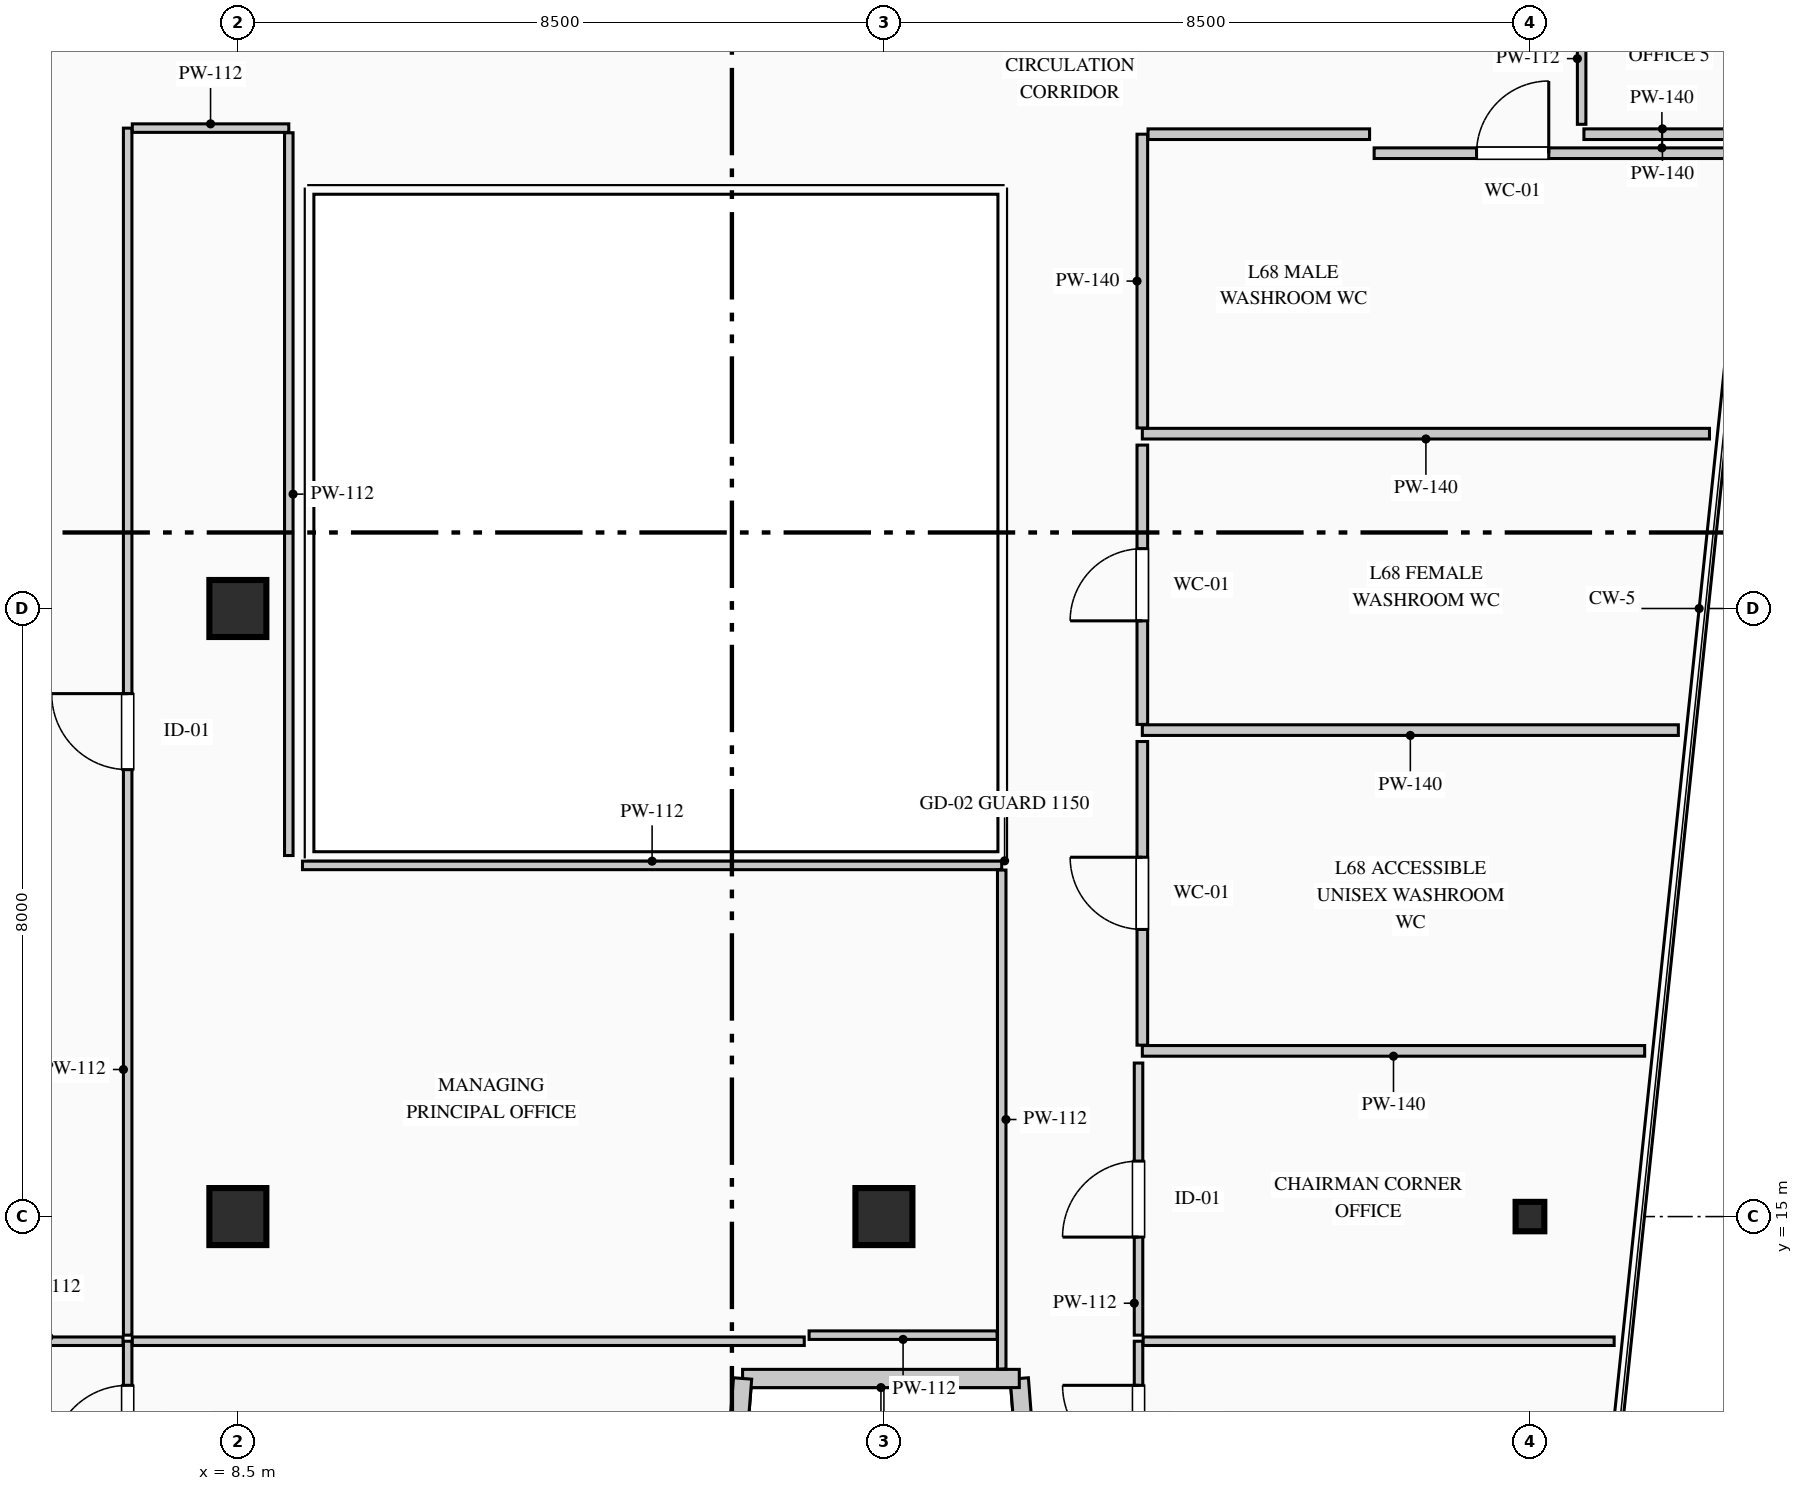
"""IFC4 building model, lengths in metres.
Left out: names, types, materials, properties, quantities, classifications, styles, units other than length and angle.
Written with IfcOpenShell. Run it as: python <this file> out.ifc"""

import sys

from ifc_helpers import new_model, si_unit, direction, frame, frame_2d, origin, origin_2d, place, context, subcontext, project, spatial, rectangle, i_section, extrude, element, fill, save


model = new_model("IFC4")
c1 = context("Model", 3, precision=1e-05, world=origin(), true_north=direction((0.0, 1.0)))
c2 = subcontext(c1, "Body", "Model", "MODEL_VIEW")
j1 = project(units=[si_unit("LENGTHUNIT", "METRE"), si_unit("PLANEANGLEUNIT", "RADIAN")], contexts=[c1])
p1 = place(None, origin())
s1 = spatial("IfcSite", under=j1, at=p1, CompositionType="ELEMENT")
p2 = place(p1, origin())
s2 = spatial("IfcBuilding", under=s1, at=p2, CompositionType="ELEMENT")
p3 = place(p2, frame((0.0, 0.0, 284.35)))
s3 = spatial("IfcBuildingStorey", under=s2, at=p3, CompositionType="ELEMENT", Elevation=284.35)
for number, where, z_axis, x_axis in (
    (1, (8.5, 15.0, 0.0), (0.0, 0.0, 1.0), (1.0, 0.0, 0.0)),
    (2, (8.5, 23.0, 0.0), (0.0, 0.0, 1.0), (1.0, 0.0, 0.0)),
    (3, (17.0, 15.0, 0.0), (0.0, 0.0, 1.0), (1.0, 0.0, 0.0)),
):
    element("IfcColumn", number, at=place(p3, frame(where, z_axis=z_axis, x_axis=x_axis)), inside=s3, PredefinedType="COLUMN", context=c2, shape_type="SweptSolid", body=[
        extrude(rectangle(XDim=0.75, YDim=0.75, at=origin_2d()), origin(), (0.0, 0.0, 1.0), 3.95),
    ])
p4 = place(p3, frame((25.5, 15.0, 0.0), z_axis=(0.0, 0.0, 1.0), x_axis=(1.0, 0.0, 0.0)))
e4 = element("IfcColumn", 4, at=p4, inside=s3, PredefinedType="COLUMN", context=c2, shape_type="SweptSolid", body=[
    extrude(i_section(OverallWidth=0.378, OverallDepth=0.387, WebThickness=0.022, FlangeThickness=0.037, FilletRadius=0.015, at=origin_2d()), origin(), (0.0, 0.0, 1.0), 3.95),
])
p5 = place(p3, frame((19.581, 2.62, 0.0), z_axis=(0.0, 0.0, 1.0), x_axis=(-0.077816860153, 0.996967670627, 0.0)))
e5 = element("IfcWall", 5, at=p5, inside=s3, PredefinedType="STANDARD", context=c2, shape_type="SweptSolid", body=[
    extrude(rectangle(XDim=10.281, YDim=0.24, at=frame_2d((5.141, 0.0))), origin(), (0.0, 0.0, 1.0), 3.7),
])
p6 = place(p5, frame((5.755, 0.0, 0.9)))
e6 = element("IfcOpeningElement", 6, at=p6, cuts=e5, PredefinedType="OPENING", context=c2, shape_type="SweptSolid", body=[
    extrude(rectangle(XDim=1.65, YDim=1.95, at=frame_2d((0.825, 0.975))), frame((0.0, 0.13, 0.0), z_axis=(0.0, -1.0, 0.0), x_axis=(1.0, 0.0, 0.0)), (0.0, 0.0, 1.0), 0.26),
])
p7 = place(p3, frame((18.781, 12.87, 0.0), z_axis=(0.0, 0.0, 1.0), x_axis=(-1.0, 0.0, 0.0)))
e7 = element("IfcWall", 7, at=p7, inside=s3, PredefinedType="STANDARD", context=c2, shape_type="SweptSolid", body=[
    extrude(rectangle(XDim=3.641, YDim=0.24, at=frame_2d((1.82, 0.0))), origin(), (0.0, 0.0, 1.0), 3.7),
])
p8 = place(p3, frame((15.14, 12.87, 0.0), z_axis=(0.0, 0.0, 1.0), x_axis=(-0.077793257511, -0.996969512616, 0.0)))
e8 = element("IfcWall", 8, at=p8, inside=s3, PredefinedType="STANDARD", context=c2, shape_type="SweptSolid", body=[
    extrude(rectangle(XDim=10.281, YDim=0.24, at=frame_2d((5.141, 0.0))), origin(), (0.0, 0.0, 1.0), 3.7),
])
p9 = place(p8, frame((2.876, 0.0, 0.9)))
e9 = element("IfcOpeningElement", 9, at=p9, cuts=e8, PredefinedType="OPENING", context=c2, shape_type="SweptSolid", body=[
    extrude(rectangle(XDim=1.65, YDim=1.95, at=frame_2d((0.825, 0.975))), frame((0.0, 0.13, 0.0), z_axis=(0.0, -1.0, 0.0), x_axis=(1.0, 0.0, 0.0)), (0.0, 0.0, 1.0), 0.26),
])
p10 = place(p3, frame((23.45, 28.99, 0.0), z_axis=(0.0, 0.0, 1.0), x_axis=(1.0, 0.0, 0.0)))
e10 = element("IfcWall", 10, at=p10, inside=s3, PredefinedType="PARTITIONING", context=c2, shape_type="SweptSolid", body=[
    extrude(rectangle(XDim=4.8, YDim=0.14, at=frame_2d((2.4, 0.0))), origin(), (0.0, 0.0, 1.0), 3.7),
])
p11 = place(p10, frame((1.347, 0.0, 0.0)))
e11 = element("IfcOpeningElement", 11, at=p11, cuts=e10, PredefinedType="OPENING", context=c2, shape_type="SweptSolid", body=[
    extrude(rectangle(XDim=0.95, YDim=2.15, at=frame_2d((0.475, 1.075))), frame((0.0, 0.08, 0.0), z_axis=(0.0, -1.0, 0.0), x_axis=(1.0, 0.0, 0.0)), (0.0, 0.0, 1.0), 0.16),
])
p12 = place(p3, frame((26.21, 29.24, 0.0), z_axis=(0.0, 0.0, 1.0), x_axis=(1.0, 0.0, 0.0)))
e12 = element("IfcWall", 12, at=p12, inside=s3, PredefinedType="PARTITIONING", context=c2, shape_type="SweptSolid", body=[
    extrude(rectangle(XDim=2.066, YDim=0.14, at=frame_2d((1.033, 0.0))), origin(), (0.0, 0.0, 1.0), 3.7),
])
p13 = place(p3, frame((27.862, 25.3, 0.0), z_axis=(0.0, 0.0, 1.0), x_axis=(-1.0, 0.0, 0.0)))
e13 = element("IfcWall", 13, at=p13, inside=s3, PredefinedType="PARTITIONING", context=c2, shape_type="SweptSolid", body=[
    extrude(rectangle(XDim=7.462, YDim=0.14, at=frame_2d((3.731, 0.0))), origin(), (0.0, 0.0, 1.0), 3.7),
])
p14 = place(p3, frame((20.4, 25.375, 0.0), z_axis=(0.0, 0.0, 1.0), x_axis=(0.0, 1.0, 0.0)))
e14 = element("IfcWall", 14, at=p14, inside=s3, PredefinedType="PARTITIONING", context=c2, shape_type="SweptSolid", body=[
    extrude(rectangle(XDim=3.865, YDim=0.14, at=frame_2d((1.933, 0.0))), origin(), (0.0, 0.0, 1.0), 3.7),
])
p15 = place(p3, frame((20.475, 29.24, 0.0), z_axis=(0.0, 0.0, 1.0), x_axis=(1.0, 0.0, 0.0)))
e15 = element("IfcWall", 15, at=p15, inside=s3, PredefinedType="PARTITIONING", context=c2, shape_type="SweptSolid", body=[
    extrude(rectangle(XDim=2.915, YDim=0.14, at=frame_2d((1.458, 0.0))), origin(), (0.0, 0.0, 1.0), 3.7),
])
p16 = place(p3, frame((27.452, 21.4, 0.0), z_axis=(0.0, 0.0, 1.0), x_axis=(-1.0, 0.0, 0.0)))
e16 = element("IfcWall", 16, at=p16, inside=s3, PredefinedType="PARTITIONING", context=c2, shape_type="SweptSolid", body=[
    extrude(rectangle(XDim=7.052, YDim=0.14, at=frame_2d((3.526, 0.0))), origin(), (0.0, 0.0, 1.0), 3.7),
])
p17 = place(p3, frame((20.4, 21.475, 0.0), z_axis=(0.0, 0.0, 1.0), x_axis=(0.0, 1.0, 0.0)))
e17 = element("IfcWall", 17, at=p17, inside=s3, PredefinedType="PARTITIONING", context=c2, shape_type="SweptSolid", body=[
    extrude(rectangle(XDim=3.675, YDim=0.14, at=frame_2d((1.837, 0.0))), origin(), (0.0, 0.0, 1.0), 3.7),
])
p18 = place(p17, frame((1.363, 0.0, 0.0)))
e18 = element("IfcOpeningElement", 18, at=p18, cuts=e17, PredefinedType="OPENING", context=c2, shape_type="SweptSolid", body=[
    extrude(rectangle(XDim=0.95, YDim=2.15, at=frame_2d((0.475, 1.075))), frame((0.0, 0.08, 0.0), z_axis=(0.0, -1.0, 0.0), x_axis=(1.0, 0.0, 0.0)), (0.0, 0.0, 1.0), 0.16),
])
p19 = place(p3, frame((27.009, 17.18, 0.0), z_axis=(0.0, 0.0, 1.0), x_axis=(-1.0, 0.0, 0.0)))
e19 = element("IfcWall", 19, at=p19, inside=s3, PredefinedType="PARTITIONING", context=c2, shape_type="SweptSolid", body=[
    extrude(rectangle(XDim=6.609, YDim=0.14, at=frame_2d((3.305, 0.0))), origin(), (0.0, 0.0, 1.0), 3.7),
])
p20 = place(p3, frame((20.4, 17.255, 0.0), z_axis=(0.0, 0.0, 1.0), x_axis=(0.0, 1.0, 0.0)))
e20 = element("IfcWall", 20, at=p20, inside=s3, PredefinedType="PARTITIONING", context=c2, shape_type="SweptSolid", body=[
    extrude(rectangle(XDim=3.995, YDim=0.14, at=frame_2d((1.998, 0.0))), origin(), (0.0, 0.0, 1.0), 3.7),
])
p21 = place(p20, frame((1.522, 0.0, 0.0)))
e21 = element("IfcOpeningElement", 21, at=p21, cuts=e20, PredefinedType="OPENING", context=c2, shape_type="SweptSolid", body=[
    extrude(rectangle(XDim=0.95, YDim=2.15, at=frame_2d((0.475, 1.075))), frame((0.0, 0.08, 0.0), z_axis=(0.0, -1.0, 0.0), x_axis=(1.0, 0.0, 0.0)), (0.0, 0.0, 1.0), 0.16),
])
p22 = place(p3, frame((7.05, 11.2, 0.0), z_axis=(0.0, 0.0, 1.0), x_axis=(0.0, 1.0, 0.0)))
e22 = element("IfcWall", 22, at=p22, inside=s3, PredefinedType="PARTITIONING", context=c2, shape_type="SweptSolid", body=[
    extrude(rectangle(XDim=2.16, YDim=0.112, at=frame_2d((1.08, 0.0))), origin(), (0.0, 0.0, 1.0), 3.7),
])
p23 = place(p22, frame((0.58, 0.0, 0.0)))
e23 = element("IfcOpeningElement", 23, at=p23, cuts=e22, PredefinedType="OPENING", context=c2, shape_type="SweptSolid", body=[
    extrude(rectangle(XDim=1.0, YDim=2.15, at=frame_2d((0.5, 1.075))), frame((0.0, 0.066, 0.0), z_axis=(0.0, -1.0, 0.0), x_axis=(1.0, 0.0, 0.0)), (0.0, 0.0, 1.0), 0.132),
])
p24 = place(p3, frame((5.038, 13.36, 0.0), z_axis=(0.0, 0.0, 1.0), x_axis=(1.0, 0.0, 0.0)))
e24 = element("IfcWall", 24, at=p24, inside=s3, PredefinedType="PARTITIONING", context=c2, shape_type="SweptSolid", body=[
    extrude(rectangle(XDim=1.951, YDim=0.112, at=frame_2d((0.976, 0.0))), origin(), (0.0, 0.0, 1.0), 3.7),
])
p25 = place(p3, frame((7.111, 13.36, 0.0), z_axis=(0.0, 0.0, 1.0), x_axis=(1.0, 0.0, 0.0)))
e25 = element("IfcWall", 25, at=p25, inside=s3, PredefinedType="PARTITIONING", context=c2, shape_type="SweptSolid", body=[
    extrude(rectangle(XDim=8.841, YDim=0.112, at=frame_2d((4.42, 0.0))), origin(), (0.0, 0.0, 1.0), 3.7),
])
p26 = place(p3, frame((20.35, 11.2, 0.0), z_axis=(0.0, 0.0, 1.0), x_axis=(0.0, 1.0, 0.0)))
e26 = element("IfcWall", 26, at=p26, inside=s3, PredefinedType="PARTITIONING", context=c2, shape_type="SweptSolid", body=[
    extrude(rectangle(XDim=2.16, YDim=0.112, at=frame_2d((1.08, 0.0))), origin(), (0.0, 0.0, 1.0), 3.7),
])
p27 = place(p26, frame((0.58, 0.0, 0.0)))
e27 = element("IfcOpeningElement", 27, at=p27, cuts=e26, PredefinedType="OPENING", context=c2, shape_type="SweptSolid", body=[
    extrude(rectangle(XDim=1.0, YDim=2.15, at=frame_2d((0.5, 1.075))), frame((0.0, 0.066, 0.0), z_axis=(0.0, -1.0, 0.0), x_axis=(1.0, 0.0, 0.0)), (0.0, 0.0, 1.0), 0.132),
])
p28 = place(p3, frame((20.411, 13.36, 0.0), z_axis=(0.0, 0.0, 1.0), x_axis=(1.0, 0.0, 0.0)))
e28 = element("IfcWall", 28, at=p28, inside=s3, PredefinedType="PARTITIONING", context=c2, shape_type="SweptSolid", body=[
    extrude(rectangle(XDim=6.197, YDim=0.112, at=frame_2d((3.099, 0.0))), origin(), (0.0, 0.0, 1.0), 3.7),
])
p29 = place(p3, frame((20.35, 13.44, 0.0), z_axis=(0.0, 0.0, 1.0), x_axis=(0.0, 1.0, 0.0)))
e29 = element("IfcWall", 29, at=p29, inside=s3, PredefinedType="PARTITIONING", context=c2, shape_type="SweptSolid", body=[
    extrude(rectangle(XDim=3.58, YDim=0.112, at=frame_2d((1.79, 0.0))), origin(), (0.0, 0.0, 1.0), 3.7),
])
p30 = place(p29, frame((1.29, 0.0, 0.0)))
e30 = element("IfcOpeningElement", 30, at=p30, cuts=e29, PredefinedType="OPENING", context=c2, shape_type="SweptSolid", body=[
    extrude(rectangle(XDim=1.0, YDim=2.15, at=frame_2d((0.5, 1.075))), frame((0.0, 0.066, 0.0), z_axis=(0.0, -1.0, 0.0), x_axis=(1.0, 0.0, 0.0)), (0.0, 0.0, 1.0), 0.132),
])
p31 = place(p3, frame((9.35, 19.62, 0.0), z_axis=(0.0, 0.0, 1.0), x_axis=(1.0, 0.0, 0.0)))
e31 = element("IfcWall", 31, at=p31, inside=s3, PredefinedType="PARTITIONING", context=c2, shape_type="SweptSolid", body=[
    extrude(rectangle(XDim=9.2, YDim=0.112, at=frame_2d((4.6, 0.0))), origin(), (0.0, 0.0, 1.0), 3.7),
])
p32 = place(p3, frame((18.55, 19.559, 0.0), z_axis=(0.0, 0.0, 1.0), x_axis=(0.0, -1.0, 0.0)))
e32 = element("IfcWall", 32, at=p32, inside=s3, PredefinedType="PARTITIONING", context=c2, shape_type="SweptSolid", body=[
    extrude(rectangle(XDim=6.564, YDim=0.112, at=frame_2d((3.282, 0.0))), origin(), (0.0, 0.0, 1.0), 3.7),
])
p33 = place(p3, frame((18.489, 13.44, 0.0), z_axis=(0.0, 0.0, 1.0), x_axis=(-1.0, 0.0, 0.0)))
e33 = element("IfcWall", 33, at=p33, inside=s3, PredefinedType="PARTITIONING", context=c2, shape_type="SweptSolid", body=[
    extrude(rectangle(XDim=2.474, YDim=0.112, at=frame_2d((1.237, 0.0))), origin(), (0.0, 0.0, 1.0), 3.7),
])
p34 = place(p3, frame((7.05, 13.44, 0.0), z_axis=(0.0, 0.0, 1.0), x_axis=(0.0, 1.0, 0.0)))
e34 = element("IfcWall", 34, at=p34, inside=s3, PredefinedType="PARTITIONING", context=c2, shape_type="SweptSolid", body=[
    extrude(rectangle(XDim=15.88, YDim=0.112, at=frame_2d((7.94, 0.0))), origin(), (0.0, 0.0, 1.0), 3.7),
])
p35 = place(p34, frame((7.44, 0.0, 0.0)))
e35 = element("IfcOpeningElement", 35, at=p35, cuts=e34, PredefinedType="OPENING", context=c2, shape_type="SweptSolid", body=[
    extrude(rectangle(XDim=1.0, YDim=2.15, at=frame_2d((0.5, 1.075))), frame((0.0, 0.066, 0.0), z_axis=(0.0, -1.0, 0.0), x_axis=(1.0, 0.0, 0.0)), (0.0, 0.0, 1.0), 0.132),
])
p36 = place(p3, frame((7.111, 29.32, 0.0), z_axis=(0.0, 0.0, 1.0), x_axis=(1.0, 0.0, 0.0)))
e36 = element("IfcWall", 36, at=p36, inside=s3, PredefinedType="PARTITIONING", context=c2, shape_type="SweptSolid", body=[
    extrude(rectangle(XDim=2.059, YDim=0.112, at=frame_2d((1.029, 0.0))), origin(), (0.0, 0.0, 1.0), 3.7),
])
p37 = place(p3, frame((9.17, 29.259, 0.0), z_axis=(0.0, 0.0, 1.0), x_axis=(0.0, -1.0, 0.0)))
e37 = element("IfcWall", 37, at=p37, inside=s3, PredefinedType="PARTITIONING", context=c2, shape_type="SweptSolid", body=[
    extrude(rectangle(XDim=9.509, YDim=0.112, at=frame_2d((4.754, 0.0))), origin(), (0.0, 0.0, 1.0), 3.285),
])
p38 = place(p3, frame((26.18, 29.37, 0.0), z_axis=(0.0, 0.0, 1.0), x_axis=(0.0, 1.0, 0.0)))
e38 = element("IfcWall", 38, at=p38, inside=s3, PredefinedType="PARTITIONING", context=c2, shape_type="SweptSolid", body=[
    extrude(rectangle(XDim=3.409, YDim=0.112, at=frame_2d((1.705, 0.0))), origin(), (0.0, 0.0, 1.0), 3.7),
])
p39 = place(p38, frame((2.253, 0.0, 0.0)))
e39 = element("IfcOpeningElement", 39, at=p39, cuts=e38, PredefinedType="OPENING", context=c2, shape_type="SweptSolid", body=[
    extrude(rectangle(XDim=0.85, YDim=2.1, at=frame_2d((0.425, 1.05))), frame((0.0, 0.066, 0.0), z_axis=(0.0, -1.0, 0.0), x_axis=(1.0, 0.0, 0.0)), (0.0, 0.0, 1.0), 0.132),
])
p40 = place(p11, origin())
e40 = element("IfcDoor", 40, at=p40, inside=s3, OperationType="SINGLE_SWING_RIGHT", PredefinedType="DOOR", context=c2, shape_type="SweptSolid", body=[
    extrude(rectangle(XDim=0.95, YDim=2.15, at=frame_2d((0.475, 1.075))), frame((0.0, 0.025, 0.0), z_axis=(0.0, -1.0, 0.0), x_axis=(1.0, 0.0, 0.0)), (0.0, 0.0, 1.0), 0.05),
])
fill(e11, e40)
p41 = place(p18, origin())
e41 = element("IfcDoor", 41, at=p41, inside=s3, OperationType="SINGLE_SWING_LEFT", PredefinedType="DOOR", context=c2, shape_type="SweptSolid", body=[
    extrude(rectangle(XDim=0.95, YDim=2.15, at=frame_2d((0.475, 1.075))), frame((0.0, 0.025, 0.0), z_axis=(0.0, -1.0, 0.0), x_axis=(1.0, 0.0, 0.0)), (0.0, 0.0, 1.0), 0.05),
])
fill(e18, e41)
p42 = place(p21, origin())
e42 = element("IfcDoor", 42, at=p42, inside=s3, OperationType="SINGLE_SWING_RIGHT", PredefinedType="DOOR", context=c2, shape_type="SweptSolid", body=[
    extrude(rectangle(XDim=0.95, YDim=2.15, at=frame_2d((0.475, 1.075))), frame((0.0, 0.025, 0.0), z_axis=(0.0, -1.0, 0.0), x_axis=(1.0, 0.0, 0.0)), (0.0, 0.0, 1.0), 0.05),
])
fill(e21, e42)
p43 = place(p23, origin())
e43 = element("IfcDoor", 43, at=p43, inside=s3, OperationType="SINGLE_SWING_LEFT", PredefinedType="DOOR", context=c2, shape_type="SweptSolid", body=[
    extrude(rectangle(XDim=1.0, YDim=2.15, at=frame_2d((0.5, 1.075))), frame((0.0, 0.025, 0.0), z_axis=(0.0, -1.0, 0.0), x_axis=(1.0, 0.0, 0.0)), (0.0, 0.0, 1.0), 0.05),
])
fill(e23, e43)
p44 = place(p27, origin())
e44 = element("IfcDoor", 44, at=p44, inside=s3, OperationType="SINGLE_SWING_RIGHT", PredefinedType="DOOR", context=c2, shape_type="SweptSolid", body=[
    extrude(rectangle(XDim=1.0, YDim=2.15, at=frame_2d((0.5, 1.075))), frame((0.0, 0.025, 0.0), z_axis=(0.0, -1.0, 0.0), x_axis=(1.0, 0.0, 0.0)), (0.0, 0.0, 1.0), 0.05),
])
fill(e27, e44)
p45 = place(p30, origin())
e45 = element("IfcDoor", 45, at=p45, inside=s3, OperationType="SINGLE_SWING_LEFT", PredefinedType="DOOR", context=c2, shape_type="SweptSolid", body=[
    extrude(rectangle(XDim=1.0, YDim=2.15, at=frame_2d((0.5, 1.075))), frame((0.0, 0.025, 0.0), z_axis=(0.0, -1.0, 0.0), x_axis=(1.0, 0.0, 0.0)), (0.0, 0.0, 1.0), 0.05),
])
fill(e30, e45)
p46 = place(p35, origin())
e46 = element("IfcDoor", 46, at=p46, inside=s3, OperationType="SINGLE_SWING_RIGHT", PredefinedType="DOOR", context=c2, shape_type="SweptSolid", body=[
    extrude(rectangle(XDim=1.0, YDim=2.15, at=frame_2d((0.5, 1.075))), frame((0.0, 0.025, 0.0), z_axis=(0.0, -1.0, 0.0), x_axis=(1.0, 0.0, 0.0)), (0.0, 0.0, 1.0), 0.05),
])
fill(e35, e46)
save(model, sys.argv[1])
